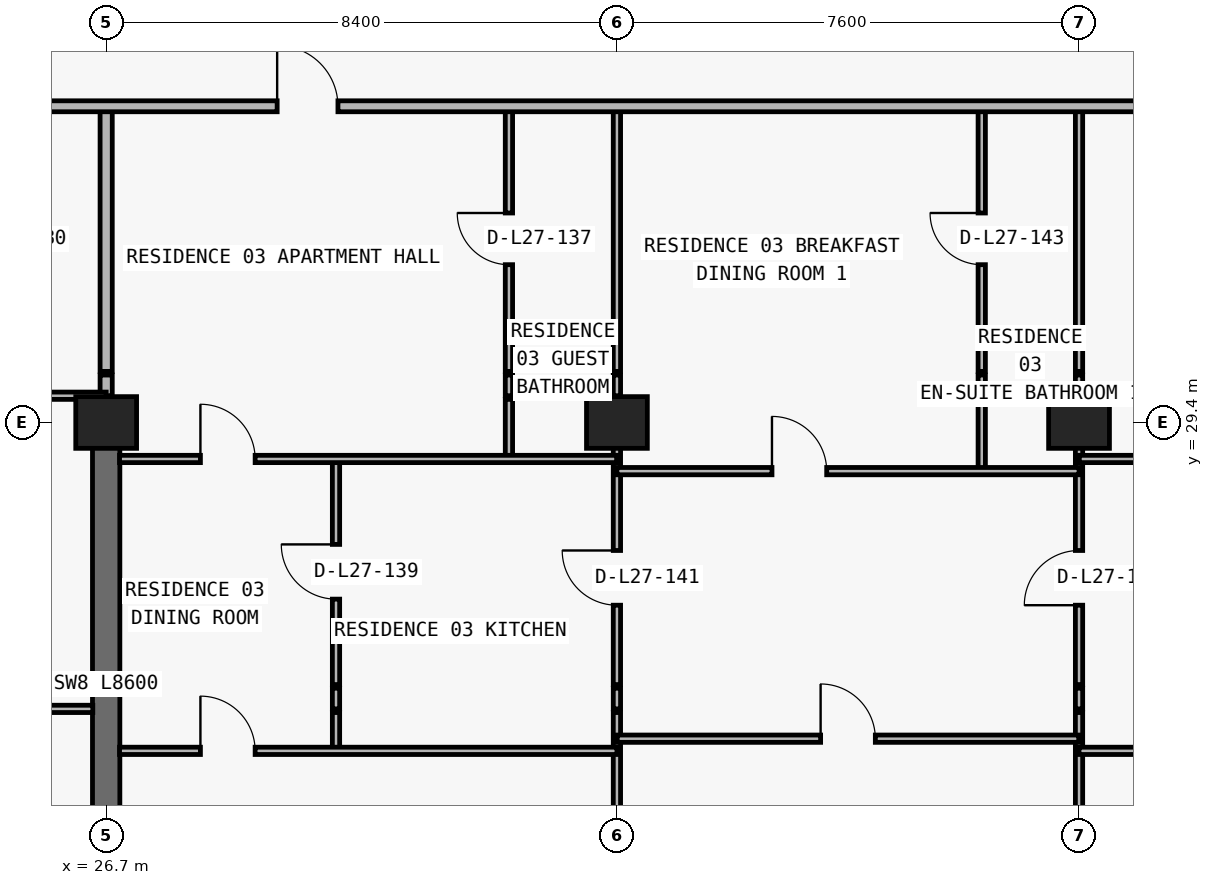
"""IFC4 building model, lengths in metres.
Left out: names, types, materials, properties, quantities, classifications, styles, units other than length and angle.
Written with IfcOpenShell. Run it as: python <this file> out.ifc"""

import sys

from ifc_helpers import new_model, si_unit, direction, frame, frame_2d, origin, origin_2d, place, context, subcontext, project, spatial, rectangle, extrude, element, fill, save


model = new_model("IFC4")
c1 = context("Model", 3, precision=1e-05, world=origin(), true_north=direction((0.0, 1.0)))
c2 = subcontext(c1, "Body", "Model", "MODEL_VIEW")
j1 = project(units=[si_unit("LENGTHUNIT", "METRE"), si_unit("PLANEANGLEUNIT", "RADIAN")], contexts=[c1])
p1 = place(None, origin())
s1 = spatial("IfcSite", under=j1, at=p1, CompositionType="ELEMENT")
p2 = place(p1, origin())
s2 = spatial("IfcBuilding", under=s1, at=p2, CompositionType="ELEMENT")
p3 = place(p2, frame((0.0, 0.0, 102.6)))
s3 = spatial("IfcBuildingStorey", under=s2, at=p3, CompositionType="ELEMENT", Elevation=102.6)
for number, where, z_axis, x_axis in (
    (1, (26.7, 29.4, 0.0), (0.0, 0.0, 1.0), (1.0, 0.0, 0.0)),
    (2, (35.1, 29.4, 0.0), (0.0, 0.0, 1.0), (1.0, 0.0, 0.0)),
    (3, (42.7, 29.4, 0.0), (0.0, 0.0, 1.0), (1.0, 0.0, 0.0)),
):
    element("IfcColumn", number, at=place(p3, frame(where, z_axis=z_axis, x_axis=x_axis)), inside=s3, PredefinedType="COLUMN", context=c2, shape_type="SweptSolid", body=[
        extrude(rectangle(XDim=1.0, YDim=0.85, at=origin_2d()), origin(), (0.0, 0.0, 1.0), 3.05),
    ])
p4 = place(p3, frame((26.7, 20.8, 0.0), z_axis=(0.0, 0.0, 1.0), x_axis=(0.0, 1.0, 0.0)))
e4 = element("IfcWall", 4, at=p4, inside=s3, PredefinedType="SHEAR", context=c2, shape_type="SweptSolid", body=[
    extrude(rectangle(XDim=8.6, YDim=0.45, at=frame_2d((4.3, 0.0))), origin(), (0.0, 0.0, 1.0), 3.05),
])
p5 = place(p3, frame((26.7, 29.405, 0.0), z_axis=(0.0, 0.0, 1.0), x_axis=(0.0, 1.0, 0.0)))
e5 = element("IfcWall", 5, at=p5, inside=s3, PredefinedType="PARTITIONING", context=c2, shape_type="SweptSolid", body=[
    extrude(rectangle(XDim=0.375, YDim=0.2, at=frame_2d((0.188, 0.0))), origin(), (0.0, 0.0, 1.0), 3.05),
])
p6 = place(p3, frame((26.7, 29.84, 0.0), z_axis=(0.0, 0.0, 1.0), x_axis=(0.0, 1.0, 0.0)))
e6 = element("IfcWall", 6, at=p6, inside=s3, PredefinedType="PARTITIONING", context=c2, shape_type="SweptSolid", body=[
    extrude(rectangle(XDim=0.34, YDim=0.2, at=frame_2d((0.17, 0.0))), origin(), (0.0, 0.0, 1.0), 2.335),
])
p7 = place(p3, frame((26.7, 30.24, 0.0), z_axis=(0.0, 0.0, 1.0), x_axis=(0.0, 1.0, 0.0)))
e7 = element("IfcWall", 7, at=p7, inside=s3, PredefinedType="PARTITIONING", context=c2, shape_type="SweptSolid", body=[
    extrude(rectangle(XDim=4.36, YDim=0.2, at=frame_2d((2.18, 0.0))), origin(), (0.0, 0.0, 1.0), 2.335),
])
p8 = place(p3, frame((30.48, 24.0, 0.0), z_axis=(0.0, 0.0, 1.0), x_axis=(0.0, 1.0, 0.0)))
e8 = element("IfcWall", 8, at=p8, inside=s3, PredefinedType="PARTITIONING", context=c2, shape_type="SweptSolid", body=[
    extrude(rectangle(XDim=0.63, YDim=0.12, at=frame_2d((0.315, 0.0))), origin(), (0.0, 0.0, 1.0), 3.05),
])
p9 = place(p3, frame((30.48, 24.69, 0.0), z_axis=(0.0, 0.0, 1.0), x_axis=(0.0, 1.0, 0.0)))
e9 = element("IfcWall", 9, at=p9, inside=s3, PredefinedType="PARTITIONING", context=c2, shape_type="SweptSolid", body=[
    extrude(rectangle(XDim=0.34, YDim=0.12, at=frame_2d((0.17, 0.0))), origin(), (0.0, 0.0, 1.0), 3.05),
])
p10 = place(p3, frame((30.48, 25.09, 0.0), z_axis=(0.0, 0.0, 1.0), x_axis=(0.0, 1.0, 0.0)))
e10 = element("IfcWall", 10, at=p10, inside=s3, PredefinedType="PARTITIONING", context=c2, shape_type="SweptSolid", body=[
    extrude(rectangle(XDim=3.71, YDim=0.12, at=frame_2d((1.855, 0.0))), origin(), (0.0, 0.0, 1.0), 3.05),
])
p11 = place(p10, frame((1.405, 0.0, 0.0)))
e11 = element("IfcOpeningElement", 11, at=p11, cuts=e10, PredefinedType="OPENING", context=c2, shape_type="SweptSolid", body=[
    extrude(rectangle(XDim=0.9, YDim=2.15, at=frame_2d((0.45, 1.075))), frame((0.0, 0.07, 0.0), z_axis=(0.0, -1.0, 0.0), x_axis=(1.0, 0.0, 0.0)), (0.0, 0.0, 1.0), 0.14),
])
p12 = place(p3, frame((33.324, 28.8, 0.0), z_axis=(0.0, 0.0, 1.0), x_axis=(0.0, 1.0, 0.0)))
e12 = element("IfcWall", 12, at=p12, inside=s3, PredefinedType="PARTITIONING", context=c2, shape_type="SweptSolid", body=[
    extrude(rectangle(XDim=0.98, YDim=0.12, at=frame_2d((0.49, 0.0))), origin(), (0.0, 0.0, 1.0), 3.05),
])
p13 = place(p3, frame((33.324, 29.84, 0.0), z_axis=(0.0, 0.0, 1.0), x_axis=(0.0, 1.0, 0.0)))
e13 = element("IfcWall", 13, at=p13, inside=s3, PredefinedType="PARTITIONING", context=c2, shape_type="SweptSolid", body=[
    extrude(rectangle(XDim=0.34, YDim=0.12, at=frame_2d((0.17, 0.0))), origin(), (0.0, 0.0, 1.0), 3.05),
])
p14 = place(p3, frame((33.324, 30.24, 0.0), z_axis=(0.0, 0.0, 1.0), x_axis=(0.0, 1.0, 0.0)))
e14 = element("IfcWall", 14, at=p14, inside=s3, PredefinedType="PARTITIONING", context=c2, shape_type="SweptSolid", body=[
    extrude(rectangle(XDim=4.36, YDim=0.12, at=frame_2d((2.18, 0.0))), origin(), (0.0, 0.0, 1.0), 3.05),
])
p15 = place(p14, frame((1.755, 0.0, 0.0)))
e15 = element("IfcOpeningElement", 15, at=p15, cuts=e14, PredefinedType="OPENING", context=c2, shape_type="SweptSolid", body=[
    extrude(rectangle(XDim=0.85, YDim=2.1, at=frame_2d((0.425, 1.05))), frame((0.0, 0.07, 0.0), z_axis=(0.0, -1.0, 0.0), x_axis=(1.0, 0.0, 0.0)), (0.0, 0.0, 1.0), 0.14),
])
p16 = place(p3, frame((35.1, 8.84, 0.0), z_axis=(0.0, 0.0, 1.0), x_axis=(0.0, 1.0, 0.0)))
e16 = element("IfcWall", 16, at=p16, inside=s3, PredefinedType="PARTITIONING", context=c2, shape_type="SweptSolid", body=[
    extrude(rectangle(XDim=15.79, YDim=0.12, at=frame_2d((7.895, 0.0))), origin(), (0.0, 0.0, 1.0), 2.174),
])
p17 = place(p3, frame((35.1, 24.69, 0.0), z_axis=(0.0, 0.0, 1.0), x_axis=(0.0, 1.0, 0.0)))
e17 = element("IfcWall", 17, at=p17, inside=s3, PredefinedType="PARTITIONING", context=c2, shape_type="SweptSolid", body=[
    extrude(rectangle(XDim=0.34, YDim=0.12, at=frame_2d((0.17, 0.0))), origin(), (0.0, 0.0, 1.0), 2.174),
])
p18 = place(p3, frame((35.1, 25.09, 0.0), z_axis=(0.0, 0.0, 1.0), x_axis=(0.0, 1.0, 0.0)))
e18 = element("IfcWall", 18, at=p18, inside=s3, PredefinedType="PARTITIONING", context=c2, shape_type="SweptSolid", body=[
    extrude(rectangle(XDim=4.69, YDim=0.12, at=frame_2d((2.345, 0.0))), origin(), (0.0, 0.0, 1.0), 2.174),
])
p19 = place(p18, frame((1.305, 0.0, 0.0)))
e19 = element("IfcOpeningElement", 19, at=p19, cuts=e18, PredefinedType="OPENING", context=c2, shape_type="SweptSolid", body=[
    extrude(rectangle(XDim=0.9, YDim=2.124, at=frame_2d((0.45, 1.062))), frame((0.0, 0.07, 0.0), z_axis=(0.0, -1.0, 0.0), x_axis=(1.0, 0.0, 0.0)), (0.0, 0.0, 1.0), 0.14),
])
p20 = place(p3, frame((35.1, 29.84, 0.0), z_axis=(0.0, 0.0, 1.0), x_axis=(0.0, 1.0, 0.0)))
e20 = element("IfcWall", 20, at=p20, inside=s3, PredefinedType="PARTITIONING", context=c2, shape_type="SweptSolid", body=[
    extrude(rectangle(XDim=0.34, YDim=0.12, at=frame_2d((0.17, 0.0))), origin(), (0.0, 0.0, 1.0), 2.174),
])
p21 = place(p3, frame((35.1, 30.24, 0.0), z_axis=(0.0, 0.0, 1.0), x_axis=(0.0, 1.0, 0.0)))
e21 = element("IfcWall", 21, at=p21, inside=s3, PredefinedType="PARTITIONING", context=c2, shape_type="SweptSolid", body=[
    extrude(rectangle(XDim=4.36, YDim=0.12, at=frame_2d((2.18, 0.0))), origin(), (0.0, 0.0, 1.0), 2.174),
])
p22 = place(p3, frame((41.1, 28.6, 0.0), z_axis=(0.0, 0.0, 1.0), x_axis=(0.0, 1.0, 0.0)))
e22 = element("IfcWall", 22, at=p22, inside=s3, PredefinedType="PARTITIONING", context=c2, shape_type="SweptSolid", body=[
    extrude(rectangle(XDim=1.18, YDim=0.12, at=frame_2d((0.59, 0.0))), origin(), (0.0, 0.0, 1.0), 3.05),
])
p23 = place(p3, frame((41.1, 29.84, 0.0), z_axis=(0.0, 0.0, 1.0), x_axis=(0.0, 1.0, 0.0)))
e23 = element("IfcWall", 23, at=p23, inside=s3, PredefinedType="PARTITIONING", context=c2, shape_type="SweptSolid", body=[
    extrude(rectangle(XDim=0.34, YDim=0.12, at=frame_2d((0.17, 0.0))), origin(), (0.0, 0.0, 1.0), 3.05),
])
p24 = place(p3, frame((41.1, 30.24, 0.0), z_axis=(0.0, 0.0, 1.0), x_axis=(0.0, 1.0, 0.0)))
e24 = element("IfcWall", 24, at=p24, inside=s3, PredefinedType="PARTITIONING", context=c2, shape_type="SweptSolid", body=[
    extrude(rectangle(XDim=4.36, YDim=0.12, at=frame_2d((2.18, 0.0))), origin(), (0.0, 0.0, 1.0), 3.05),
])
p25 = place(p24, frame((1.755, 0.0, 0.0)))
e25 = element("IfcOpeningElement", 25, at=p25, cuts=e24, PredefinedType="OPENING", context=c2, shape_type="SweptSolid", body=[
    extrude(rectangle(XDim=0.85, YDim=2.1, at=frame_2d((0.425, 1.05))), frame((0.0, 0.07, 0.0), z_axis=(0.0, -1.0, 0.0), x_axis=(1.0, 0.0, 0.0)), (0.0, 0.0, 1.0), 0.14),
])
p26 = place(p3, frame((42.7, 8.84, 0.0), z_axis=(0.0, 0.0, 1.0), x_axis=(0.0, 1.0, 0.0)))
e26 = element("IfcWall", 26, at=p26, inside=s3, PredefinedType="PARTITIONING", context=c2, shape_type="SweptSolid", body=[
    extrude(rectangle(XDim=15.79, YDim=0.12, at=frame_2d((7.895, 0.0))), origin(), (0.0, 0.0, 1.0), 2.174),
])
p27 = place(p3, frame((42.7, 24.69, 0.0), z_axis=(0.0, 0.0, 1.0), x_axis=(0.0, 1.0, 0.0)))
e27 = element("IfcWall", 27, at=p27, inside=s3, PredefinedType="PARTITIONING", context=c2, shape_type="SweptSolid", body=[
    extrude(rectangle(XDim=0.34, YDim=0.12, at=frame_2d((0.17, 0.0))), origin(), (0.0, 0.0, 1.0), 2.174),
])
p28 = place(p3, frame((42.7, 25.09, 0.0), z_axis=(0.0, 0.0, 1.0), x_axis=(0.0, 1.0, 0.0)))
e28 = element("IfcWall", 28, at=p28, inside=s3, PredefinedType="PARTITIONING", context=c2, shape_type="SweptSolid", body=[
    extrude(rectangle(XDim=4.69, YDim=0.12, at=frame_2d((2.345, 0.0))), origin(), (0.0, 0.0, 1.0), 2.174),
])
p29 = place(p28, frame((1.305, 0.0, 0.0)))
e29 = element("IfcOpeningElement", 29, at=p29, cuts=e28, PredefinedType="OPENING", context=c2, shape_type="SweptSolid", body=[
    extrude(rectangle(XDim=0.9, YDim=2.124, at=frame_2d((0.45, 1.062))), frame((0.0, 0.07, 0.0), z_axis=(0.0, -1.0, 0.0), x_axis=(1.0, 0.0, 0.0)), (0.0, 0.0, 1.0), 0.14),
])
p30 = place(p3, frame((42.7, 29.84, 0.0), z_axis=(0.0, 0.0, 1.0), x_axis=(0.0, 1.0, 0.0)))
e30 = element("IfcWall", 30, at=p30, inside=s3, PredefinedType="PARTITIONING", context=c2, shape_type="SweptSolid", body=[
    extrude(rectangle(XDim=0.34, YDim=0.12, at=frame_2d((0.17, 0.0))), origin(), (0.0, 0.0, 1.0), 2.174),
])
p31 = place(p3, frame((42.7, 30.24, 0.0), z_axis=(0.0, 0.0, 1.0), x_axis=(0.0, 1.0, 0.0)))
e31 = element("IfcWall", 31, at=p31, inside=s3, PredefinedType="PARTITIONING", context=c2, shape_type="SweptSolid", body=[
    extrude(rectangle(XDim=4.36, YDim=0.12, at=frame_2d((2.18, 0.0))), origin(), (0.0, 0.0, 1.0), 2.174),
])
p32 = place(p3, frame((26.92, 24.0, 0.0), z_axis=(0.0, 0.0, 1.0), x_axis=(1.0, 0.0, 0.0)))
e32 = element("IfcWall", 32, at=p32, inside=s3, PredefinedType="PARTITIONING", context=c2, shape_type="SweptSolid", body=[
    extrude(rectangle(XDim=8.18, YDim=0.12, at=frame_2d((4.09, 0.0))), origin(), (0.0, 0.0, 1.0), 3.05),
])
p33 = place(p32, frame((1.33, 0.0, 0.0)))
e33 = element("IfcOpeningElement", 33, at=p33, cuts=e32, PredefinedType="OPENING", context=c2, shape_type="SweptSolid", body=[
    extrude(rectangle(XDim=0.9, YDim=2.15, at=frame_2d((0.45, 1.075))), frame((0.0, 0.07, 0.0), z_axis=(0.0, -1.0, 0.0), x_axis=(1.0, 0.0, 0.0)), (0.0, 0.0, 1.0), 0.14),
])
p34 = place(p3, frame((42.7, 24.0, 0.0), z_axis=(0.0, 0.0, 1.0), x_axis=(1.0, 0.0, 0.0)))
e34 = element("IfcWall", 34, at=p34, inside=s3, PredefinedType="PARTITIONING", context=c2, shape_type="SweptSolid", body=[
    extrude(rectangle(XDim=8.18, YDim=0.12, at=frame_2d((4.09, 0.0))), origin(), (0.0, 0.0, 1.0), 3.05),
])
p35 = place(p34, frame((3.64, 0.0, 0.0)))
e35 = element("IfcOpeningElement", 35, at=p35, cuts=e34, PredefinedType="OPENING", context=c2, shape_type="SweptSolid", body=[
    extrude(rectangle(XDim=0.9, YDim=2.15, at=frame_2d((0.45, 1.075))), frame((0.0, 0.07, 0.0), z_axis=(0.0, -1.0, 0.0), x_axis=(1.0, 0.0, 0.0)), (0.0, 0.0, 1.0), 0.14),
])
p36 = place(p3, frame((35.105, 24.2, 0.0), z_axis=(0.0, 0.0, 1.0), x_axis=(1.0, 0.0, 0.0)))
e36 = element("IfcWall", 36, at=p36, inside=s3, PredefinedType="PARTITIONING", context=c2, shape_type="SweptSolid", body=[
    extrude(rectangle(XDim=7.59, YDim=0.12, at=frame_2d((3.795, 0.0))), origin(), (0.0, 0.0, 1.0), 3.05),
])
p37 = place(p36, frame((3.345, 0.0, 0.0)))
e37 = element("IfcOpeningElement", 37, at=p37, cuts=e36, PredefinedType="OPENING", context=c2, shape_type="SweptSolid", body=[
    extrude(rectangle(XDim=0.9, YDim=2.15, at=frame_2d((0.45, 1.075))), frame((0.0, 0.07, 0.0), z_axis=(0.0, -1.0, 0.0), x_axis=(1.0, 0.0, 0.0)), (0.0, 0.0, 1.0), 0.14),
])
p38 = place(p3, frame((18.3, 24.69, 0.0), z_axis=(0.0, 0.0, 1.0), x_axis=(1.0, 0.0, 0.0)))
e38 = element("IfcWall", 38, at=p38, inside=s3, PredefinedType="PARTITIONING", context=c2, shape_type="SweptSolid", body=[
    extrude(rectangle(XDim=8.18, YDim=0.12, at=frame_2d((4.09, 0.0))), origin(), (0.0, 0.0, 1.0), 3.05),
])
p39 = place(p38, frame((1.818, 0.0, 0.0)))
e39 = element("IfcOpeningElement", 39, at=p39, cuts=e38, PredefinedType="OPENING", context=c2, shape_type="SweptSolid", body=[
    extrude(rectangle(XDim=0.9, YDim=2.15, at=frame_2d((0.45, 1.075))), frame((0.0, 0.07, 0.0), z_axis=(0.0, -1.0, 0.0), x_axis=(1.0, 0.0, 0.0)), (0.0, 0.0, 1.0), 0.14),
])
p40 = place(p38, frame((5.95, 0.0, 0.0)))
e40 = element("IfcOpeningElement", 40, at=p40, cuts=e38, PredefinedType="OPENING", context=c2, shape_type="SweptSolid", body=[
    extrude(rectangle(XDim=0.9, YDim=2.15, at=frame_2d((0.45, 1.075))), frame((0.0, 0.07, 0.0), z_axis=(0.0, -1.0, 0.0), x_axis=(1.0, 0.0, 0.0)), (0.0, 0.0, 1.0), 0.14),
])
p41 = place(p3, frame((35.1, 28.6, 0.0), z_axis=(0.0, 0.0, 1.0), x_axis=(1.0, 0.0, 0.0)))
e41 = element("IfcWall", 41, at=p41, inside=s3, PredefinedType="PARTITIONING", context=c2, shape_type="SweptSolid", body=[
    extrude(rectangle(XDim=7.6, YDim=0.12, at=frame_2d((3.8, 0.0))), origin(), (0.0, 0.0, 1.0), 3.05),
])
p42 = place(p41, frame((2.55, 0.0, 0.0)))
e42 = element("IfcOpeningElement", 42, at=p42, cuts=e41, PredefinedType="OPENING", context=c2, shape_type="SweptSolid", body=[
    extrude(rectangle(XDim=0.9, YDim=2.15, at=frame_2d((0.45, 1.075))), frame((0.0, 0.07, 0.0), z_axis=(0.0, -1.0, 0.0), x_axis=(1.0, 0.0, 0.0)), (0.0, 0.0, 1.0), 0.14),
])
p43 = place(p3, frame((26.92, 28.8, 0.0), z_axis=(0.0, 0.0, 1.0), x_axis=(1.0, 0.0, 0.0)))
e43 = element("IfcWall", 43, at=p43, inside=s3, PredefinedType="PARTITIONING", context=c2, shape_type="SweptSolid", body=[
    extrude(rectangle(XDim=8.175, YDim=0.12, at=frame_2d((4.087, 0.0))), origin(), (0.0, 0.0, 1.0), 3.05),
])
p44 = place(p43, frame((1.33, 0.0, 0.0)))
e44 = element("IfcOpeningElement", 44, at=p44, cuts=e43, PredefinedType="OPENING", context=c2, shape_type="SweptSolid", body=[
    extrude(rectangle(XDim=0.9, YDim=2.15, at=frame_2d((0.45, 1.075))), frame((0.0, 0.07, 0.0), z_axis=(0.0, -1.0, 0.0), x_axis=(1.0, 0.0, 0.0)), (0.0, 0.0, 1.0), 0.14),
])
p45 = place(p3, frame((42.705, 28.8, 0.0), z_axis=(0.0, 0.0, 1.0), x_axis=(1.0, 0.0, 0.0)))
e45 = element("IfcWall", 45, at=p45, inside=s3, PredefinedType="PARTITIONING", context=c2, shape_type="SweptSolid", body=[
    extrude(rectangle(XDim=8.175, YDim=0.12, at=frame_2d((4.087, 0.0))), origin(), (0.0, 0.0, 1.0), 3.05),
])
p46 = place(p45, frame((2.877, 0.0, 0.0)))
e46 = element("IfcOpeningElement", 46, at=p46, cuts=e45, PredefinedType="OPENING", context=c2, shape_type="SweptSolid", body=[
    extrude(rectangle(XDim=0.9, YDim=2.15, at=frame_2d((0.45, 1.075))), frame((0.0, 0.07, 0.0), z_axis=(0.0, -1.0, 0.0), x_axis=(1.0, 0.0, 0.0)), (0.0, 0.0, 1.0), 0.14),
])
p47 = place(p3, frame((18.3, 29.84, 0.0), z_axis=(0.0, 0.0, 1.0), x_axis=(1.0, 0.0, 0.0)))
e47 = element("IfcWall", 47, at=p47, inside=s3, PredefinedType="PARTITIONING", context=c2, shape_type="SweptSolid", body=[
    extrude(rectangle(XDim=8.4, YDim=0.12, at=frame_2d((4.2, 0.0))), origin(), (0.0, 0.0, 1.0), 3.05),
])
p48 = place(p47, frame((1.818, 0.0, 0.0)))
e48 = element("IfcOpeningElement", 48, at=p48, cuts=e47, PredefinedType="OPENING", context=c2, shape_type="SweptSolid", body=[
    extrude(rectangle(XDim=0.9, YDim=2.15, at=frame_2d((0.45, 1.075))), frame((0.0, 0.07, 0.0), z_axis=(0.0, -1.0, 0.0), x_axis=(1.0, 0.0, 0.0)), (0.0, 0.0, 1.0), 0.14),
])
p49 = place(p3, frame((18.3, 34.6, 0.0), z_axis=(0.0, 0.0, 1.0), x_axis=(1.0, 0.0, 0.0)))
e49 = element("IfcWall", 49, at=p49, inside=s3, PredefinedType="PARTITIONING", context=c2, shape_type="SweptSolid", body=[
    extrude(rectangle(XDim=41.2, YDim=0.18, at=frame_2d((20.6, 0.0))), origin(), (0.0, 0.0, 1.0), 3.05),
])
p50 = place(p49, frame((2.691, 0.0, 0.0)))
e50 = element("IfcOpeningElement", 50, at=p50, cuts=e49, PredefinedType="OPENING", context=c2, shape_type="SweptSolid", body=[
    extrude(rectangle(XDim=1.0, YDim=2.2, at=frame_2d((0.5, 1.1))), frame((0.0, 0.1, 0.0), z_axis=(0.0, -1.0, 0.0), x_axis=(1.0, 0.0, 0.0)), (0.0, 0.0, 1.0), 0.2),
])
p51 = place(p49, frame((11.212, 0.0, 0.0)))
e51 = element("IfcOpeningElement", 51, at=p51, cuts=e49, PredefinedType="OPENING", context=c2, shape_type="SweptSolid", body=[
    extrude(rectangle(XDim=1.0, YDim=2.2, at=frame_2d((0.5, 1.1))), frame((0.0, 0.1, 0.0), z_axis=(0.0, -1.0, 0.0), x_axis=(1.0, 0.0, 0.0)), (0.0, 0.0, 1.0), 0.2),
])
p52 = place(p49, frame((35.504, 0.0, 0.0)))
e52 = element("IfcOpeningElement", 52, at=p52, cuts=e49, PredefinedType="OPENING", context=c2, shape_type="SweptSolid", body=[
    extrude(rectangle(XDim=1.0, YDim=2.2, at=frame_2d((0.5, 1.1))), frame((0.0, 0.1, 0.0), z_axis=(0.0, -1.0, 0.0), x_axis=(1.0, 0.0, 0.0)), (0.0, 0.0, 1.0), 0.2),
])
p53 = place(p51, origin())
e53 = element("IfcDoor", 53, at=p53, inside=s3, OperationType="SINGLE_SWING_LEFT", PredefinedType="DOOR", context=c2, shape_type="SweptSolid", body=[
    extrude(rectangle(XDim=1.0, YDim=2.2, at=frame_2d((0.5, 1.1))), frame((0.0, 0.025, 0.0), z_axis=(0.0, -1.0, 0.0), x_axis=(1.0, 0.0, 0.0)), (0.0, 0.0, 1.0), 0.05),
])
fill(e51, e53)
p54 = place(p15, origin())
e54 = element("IfcDoor", 54, at=p54, inside=s3, OperationType="SINGLE_SWING_RIGHT", PredefinedType="DOOR", context=c2, shape_type="SweptSolid", body=[
    extrude(rectangle(XDim=0.85, YDim=2.1, at=frame_2d((0.425, 1.05))), frame((0.0, 0.025, 0.0), z_axis=(0.0, -1.0, 0.0), x_axis=(1.0, 0.0, 0.0)), (0.0, 0.0, 1.0), 0.05),
])
fill(e15, e54)
p55 = place(p44, origin())
e55 = element("IfcDoor", 55, at=p55, inside=s3, OperationType="SINGLE_SWING_LEFT", PredefinedType="DOOR", context=c2, shape_type="SweptSolid", body=[
    extrude(rectangle(XDim=0.9, YDim=2.15, at=frame_2d((0.45, 1.075))), frame((0.0, 0.025, 0.0), z_axis=(0.0, -1.0, 0.0), x_axis=(1.0, 0.0, 0.0)), (0.0, 0.0, 1.0), 0.05),
])
fill(e44, e55)
p56 = place(p11, origin())
e56 = element("IfcDoor", 56, at=p56, inside=s3, OperationType="SINGLE_SWING_RIGHT", PredefinedType="DOOR", context=c2, shape_type="SweptSolid", body=[
    extrude(rectangle(XDim=0.9, YDim=2.15, at=frame_2d((0.45, 1.075))), frame((0.0, 0.025, 0.0), z_axis=(0.0, -1.0, 0.0), x_axis=(1.0, 0.0, 0.0)), (0.0, 0.0, 1.0), 0.05),
])
fill(e11, e56)
p57 = place(p33, origin())
e57 = element("IfcDoor", 57, at=p57, inside=s3, OperationType="SINGLE_SWING_LEFT", PredefinedType="DOOR", context=c2, shape_type="SweptSolid", body=[
    extrude(rectangle(XDim=0.9, YDim=2.15, at=frame_2d((0.45, 1.075))), frame((0.0, 0.025, 0.0), z_axis=(0.0, -1.0, 0.0), x_axis=(1.0, 0.0, 0.0)), (0.0, 0.0, 1.0), 0.05),
])
fill(e33, e57)
p58 = place(p19, origin())
e58 = element("IfcDoor", 58, at=p58, inside=s3, OperationType="SINGLE_SWING_RIGHT", PredefinedType="DOOR", context=c2, shape_type="SweptSolid", body=[
    extrude(rectangle(XDim=0.9, YDim=2.124, at=frame_2d((0.45, 1.062))), frame((0.0, 0.025, 0.0), z_axis=(0.0, -1.0, 0.0), x_axis=(1.0, 0.0, 0.0)), (0.0, 0.0, 1.0), 0.05),
])
fill(e19, e58)
p59 = place(p42, origin())
e59 = element("IfcDoor", 59, at=p59, inside=s3, OperationType="SINGLE_SWING_LEFT", PredefinedType="DOOR", context=c2, shape_type="SweptSolid", body=[
    extrude(rectangle(XDim=0.9, YDim=2.15, at=frame_2d((0.45, 1.075))), frame((0.0, 0.025, 0.0), z_axis=(0.0, -1.0, 0.0), x_axis=(1.0, 0.0, 0.0)), (0.0, 0.0, 1.0), 0.05),
])
fill(e42, e59)
p60 = place(p25, origin())
e60 = element("IfcDoor", 60, at=p60, inside=s3, OperationType="SINGLE_SWING_RIGHT", PredefinedType="DOOR", context=c2, shape_type="SweptSolid", body=[
    extrude(rectangle(XDim=0.85, YDim=2.1, at=frame_2d((0.425, 1.05))), frame((0.0, 0.025, 0.0), z_axis=(0.0, -1.0, 0.0), x_axis=(1.0, 0.0, 0.0)), (0.0, 0.0, 1.0), 0.05),
])
fill(e25, e60)
p61 = place(p37, origin())
e61 = element("IfcDoor", 61, at=p61, inside=s3, OperationType="SINGLE_SWING_LEFT", PredefinedType="DOOR", context=c2, shape_type="SweptSolid", body=[
    extrude(rectangle(XDim=0.9, YDim=2.15, at=frame_2d((0.45, 1.075))), frame((0.0, 0.025, 0.0), z_axis=(0.0, -1.0, 0.0), x_axis=(1.0, 0.0, 0.0)), (0.0, 0.0, 1.0), 0.05),
])
fill(e37, e61)
p62 = place(p29, origin())
e62 = element("IfcDoor", 62, at=p62, inside=s3, OperationType="SINGLE_SWING_LEFT", PredefinedType="DOOR", context=c2, shape_type="SweptSolid", body=[
    extrude(rectangle(XDim=0.9, YDim=2.124, at=frame_2d((0.45, 1.062))), frame((0.0, 0.025, 0.0), z_axis=(0.0, -1.0, 0.0), x_axis=(1.0, 0.0, 0.0)), (0.0, 0.0, 1.0), 0.05),
])
fill(e29, e62)
save(model, sys.argv[1])
